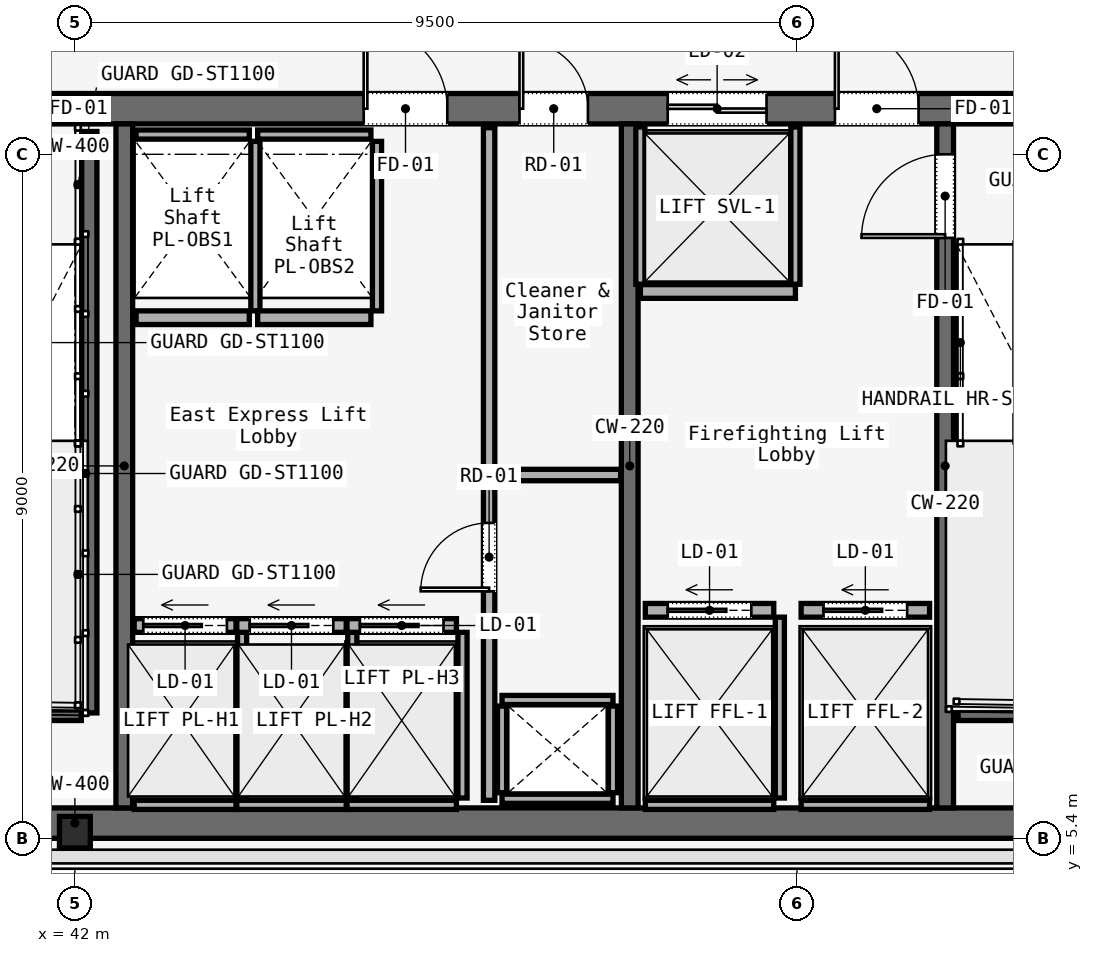
"""IFC4 building model, lengths in metres.
Left out: names, types, materials, properties, quantities, classifications, styles, units other than length and angle.
Written with IfcOpenShell. Run it as: python <this file> out.ifc"""

import sys

from ifc_helpers import new_model, si_unit, direction, frame, frame_2d, origin, origin_2d, place, context, subcontext, project, spatial, rectangle, i_section, extrude, element, fill, save


model = new_model("IFC4")
c1 = context("Model", 3, precision=1e-05, world=origin(), true_north=direction((0.0, 1.0)))
c2 = subcontext(c1, "Body", "Model", "MODEL_VIEW")
j1 = project(units=[si_unit("LENGTHUNIT", "METRE"), si_unit("PLANEANGLEUNIT", "RADIAN")], contexts=[c1])
p1 = place(None, origin())
s1 = spatial("IfcSite", under=j1, at=p1, CompositionType="ELEMENT")
p2 = place(p1, origin())
s2 = spatial("IfcBuilding", under=s1, at=p2, CompositionType="ELEMENT")
p3 = place(p2, frame((0.0, 0.0, 256.0)))
s3 = spatial("IfcBuildingStorey", under=s2, at=p3, CompositionType="ELEMENT", Elevation=256.0)
p4 = place(p3, frame((26.45, 15.0, 0.0), z_axis=(0.0, 0.0, 1.0), x_axis=(1.0, 0.0, 0.0)))
e1 = element("IfcWall", 1, at=p4, inside=s3, PredefinedType="SOLIDWALL", context=c2, shape_type="SweptSolid", body=[
    extrude(rectangle(XDim=31.1, YDim=0.4, at=frame_2d((15.55, 0.0))), origin(), (0.0, 0.0, 1.0), 3.58),
])
p5 = place(p4, frame((1.65, 0.0, 0.0)))
e2 = element("IfcOpeningElement", 2, at=p5, cuts=e1, PredefinedType="OPENING", context=c2, shape_type="SweptSolid", body=[
    extrude(rectangle(XDim=1.1, YDim=2.2, at=frame_2d((0.55, 1.1))), frame((0.0, 0.2, 0.0), z_axis=(0.0, -1.0, 0.0), x_axis=(1.0, 0.0, 0.0)), (0.0, 0.0, 1.0), 0.4),
])
p6 = place(p4, frame((13.65, 0.0, 0.0)))
e3 = element("IfcOpeningElement", 3, at=p6, cuts=e1, PredefinedType="OPENING", context=c2, shape_type="SweptSolid", body=[
    extrude(rectangle(XDim=1.1, YDim=2.2, at=frame_2d((0.55, 1.1))), frame((0.0, 0.2, 0.0), z_axis=(0.0, -1.0, 0.0), x_axis=(1.0, 0.0, 0.0)), (0.0, 0.0, 1.0), 0.4),
])
p7 = place(p4, frame((25.55, 0.0, 0.0)))
e4 = element("IfcOpeningElement", 4, at=p7, cuts=e1, PredefinedType="OPENING", context=c2, shape_type="SweptSolid", body=[
    extrude(rectangle(XDim=1.1, YDim=2.2, at=frame_2d((0.55, 1.1))), frame((0.0, 0.2, 0.0), z_axis=(0.0, -1.0, 0.0), x_axis=(1.0, 0.0, 0.0)), (0.0, 0.0, 1.0), 0.4),
])
p8 = place(p4, frame((19.35, 0.0, 0.0)))
e5 = element("IfcOpeningElement", 5, at=p8, cuts=e1, PredefinedType="OPENING", context=c2, shape_type="SweptSolid", body=[
    extrude(rectangle(XDim=1.1, YDim=2.2, at=frame_2d((0.55, 1.1))), frame((0.0, 0.2, 0.0), z_axis=(0.0, -1.0, 0.0), x_axis=(1.0, 0.0, 0.0)), (0.0, 0.0, 1.0), 0.4),
])
p9 = place(p4, frame((21.4, 0.0, 0.0)))
e6 = element("IfcOpeningElement", 6, at=p9, cuts=e1, PredefinedType="OPENING", context=c2, shape_type="SweptSolid", body=[
    extrude(rectangle(XDim=0.9, YDim=2.1, at=frame_2d((0.45, 1.05))), frame((0.0, 0.2, 0.0), z_axis=(0.0, -1.0, 0.0), x_axis=(1.0, 0.0, 0.0)), (0.0, 0.0, 1.0), 0.4),
])
p10 = place(p4, frame((6.04, 0.0, 0.0)))
e7 = element("IfcOpeningElement", 7, at=p10, cuts=e1, PredefinedType="OPENING", context=c2, shape_type="SweptSolid", body=[
    extrude(rectangle(XDim=0.95, YDim=2.2, at=frame_2d((0.475, 1.1))), frame((0.0, 0.2, 0.0), z_axis=(0.0, -1.0, 0.0), x_axis=(1.0, 0.0, 0.0)), (0.0, 0.0, 1.0), 0.4),
])
p11 = place(p4, frame((9.99, 0.0, 0.0)))
e8 = element("IfcOpeningElement", 8, at=p11, cuts=e1, PredefinedType="OPENING", context=c2, shape_type="SweptSolid", body=[
    extrude(rectangle(XDim=0.95, YDim=2.2, at=frame_2d((0.475, 1.1))), frame((0.0, 0.2, 0.0), z_axis=(0.0, -1.0, 0.0), x_axis=(1.0, 0.0, 0.0)), (0.0, 0.0, 1.0), 0.4),
])
p12 = place(p4, frame((23.35, 0.0, 0.0)))
e9 = element("IfcOpeningElement", 9, at=p12, cuts=e1, PredefinedType="OPENING", context=c2, shape_type="SweptSolid", body=[
    extrude(rectangle(XDim=1.3, YDim=2.3, at=frame_2d((0.65, 1.15))), frame((0.0, 0.2, 0.0), z_axis=(0.0, -1.0, 0.0), x_axis=(1.0, 0.0, 0.0)), (0.0, 0.0, 1.0), 0.4),
])
p13 = place(p3, frame((26.45, 5.6, 0.0), z_axis=(0.0, 0.0, 1.0), x_axis=(1.0, 0.0, 0.0)))
e10 = element("IfcWall", 10, at=p13, inside=s3, PredefinedType="SOLIDWALL", context=c2, shape_type="SweptSolid", body=[
    extrude(rectangle(XDim=31.1, YDim=0.4, at=frame_2d((15.55, 0.0))), origin(), (0.0, 0.0, 1.0), 3.58),
])
for number, where, z_axis, x_axis in (
    (11, (42.65, 5.8, 0.0), (0.0, 0.0, 1.0), (0.0, 1.0, 0.0)),
    (12, (49.3, 5.8, 0.0), (0.0, 0.0, 1.0), (0.0, 1.0, 0.0)),
):
    element("IfcWall", number, at=place(p3, frame(where, z_axis=z_axis, x_axis=x_axis)), inside=s3, PredefinedType="SOLIDWALL", context=c2, shape_type="SweptSolid", body=[
        extrude(rectangle(XDim=9.0, YDim=0.22, at=frame_2d((4.5, 0.0))), origin(), (0.0, 0.0, 1.0), 3.58),
    ])
p14 = place(p3, frame((53.45, 5.8, 0.0), z_axis=(0.0, 0.0, 1.0), x_axis=(0.0, 1.0, 0.0)))
e13 = element("IfcWall", 13, at=p14, inside=s3, PredefinedType="SOLIDWALL", context=c2, shape_type="SweptSolid", body=[
    extrude(rectangle(XDim=9.0, YDim=0.22, at=frame_2d((4.5, 0.0))), origin(), (0.0, 0.0, 1.0), 3.58),
])
p15 = place(p14, frame((7.5, 0.0, 0.0)))
e14 = element("IfcOpeningElement", 14, at=p15, cuts=e13, PredefinedType="OPENING", context=c2, shape_type="SweptSolid", body=[
    extrude(rectangle(XDim=1.1, YDim=2.2, at=frame_2d((0.55, 1.1))), frame((0.0, 0.11, 0.0), z_axis=(0.0, -1.0, 0.0), x_axis=(1.0, 0.0, 0.0)), (0.0, 0.0, 1.0), 0.22),
])
p16 = place(p3, frame((42.0, 5.48, 0.0), z_axis=(0.0, 0.0, 1.0), x_axis=(1.0, 0.0, 0.0)))
e15 = element("IfcColumn", 15, at=p16, inside=s3, PredefinedType="COLUMN", context=c2, shape_type="SweptSolid", body=[
    extrude(i_section(OverallWidth=0.406, OverallDepth=0.416, WebThickness=0.03, FlangeThickness=0.037, FilletRadius=0.015, at=origin_2d()), origin(), (0.0, 0.0, 1.0), 3.58),
])
p17 = place(p3, frame((42.19, 14.7, 0.0), z_axis=(0.0, 0.0, 1.0), x_axis=(0.0, -1.0, 0.0)))
e16 = element("IfcWall", 16, at=p17, inside=s3, PredefinedType="SOLIDWALL", context=c2, shape_type="SweptSolid", body=[
    extrude(rectangle(XDim=7.65, YDim=0.2, at=frame_2d((3.825, 0.0))), origin(), (0.0, 0.0, 1.0), 3.8),
])
for number, where, z_axis, x_axis in (
    (17, (38.97, 7.05, 0.0), (0.0, 0.0, 1.0), (1.0, 0.0, 0.0)),
    (18, (53.62, 7.05, 0.0), (0.0, 0.0, 1.0), (1.0, 0.0, 0.0)),
):
    element("IfcWall", number, at=place(p3, frame(where, z_axis=z_axis, x_axis=x_axis)), inside=s3, PredefinedType="SOLIDWALL", context=c2, shape_type="SweptSolid", body=[
        extrude(rectangle(XDim=3.115, YDim=0.2, at=frame_2d((1.558, 0.0))), origin(), (0.0, 0.0, 1.0), 3.8),
    ])
for number, where, z_axis, x_axis in (
    (19, (47.62, 5.92, 0.0), (0.0, 0.0, 1.0), (1.0, 0.0, 0.0)),
    (20, (47.62, 7.22, 0.0), (0.0, 0.0, 1.0), (1.0, 0.0, 0.0)),
):
    element("IfcWall", number, at=place(p3, frame(where, z_axis=z_axis, x_axis=x_axis)), inside=s3, PredefinedType="SOLIDWALL", context=c2, shape_type="SweptSolid", body=[
        extrude(rectangle(XDim=1.46, YDim=0.12, at=frame_2d((0.73, 0.0))), origin(), (0.0, 0.0, 1.0), 3.01),
    ])
for number, where, z_axis, x_axis in (
    (21, (47.62, 6.0, 0.0), (0.0, 0.0, 1.0), (0.0, 1.0, 0.0)),
    (22, (49.08, 6.0, 0.0), (0.0, 0.0, 1.0), (0.0, 1.0, 0.0)),
):
    element("IfcWall", number, at=place(p3, frame(where, z_axis=z_axis, x_axis=x_axis)), inside=s3, PredefinedType="SOLIDWALL", context=c2, shape_type="SweptSolid", body=[
        extrude(rectangle(XDim=1.14, YDim=0.12, at=frame_2d((0.57, 0.0))), origin(), (0.0, 0.0, 1.0), 3.01),
    ])
p18 = place(p3, frame((47.45, 5.9, 0.0), z_axis=(0.0, 0.0, 1.0), x_axis=(0.0, 1.0, 0.0)))
e23 = element("IfcWall", 23, at=p18, inside=s3, PredefinedType="PARTITIONING", context=c2, shape_type="SweptSolid", body=[
    extrude(rectangle(XDim=8.85, YDim=0.15, at=frame_2d((4.425, 0.0))), origin(), (0.0, 0.0, 1.0), 3.01),
])
p19 = place(p18, frame((2.75, 0.0, 0.0)))
e24 = element("IfcOpeningElement", 24, at=p19, cuts=e23, PredefinedType="OPENING", context=c2, shape_type="SweptSolid", body=[
    extrude(rectangle(XDim=0.9, YDim=2.1, at=frame_2d((0.45, 1.05))), frame((0.0, 0.075, 0.0), z_axis=(0.0, -1.0, 0.0), x_axis=(1.0, 0.0, 0.0)), (0.0, 0.0, 1.0), 0.15),
])
p20 = place(p3, frame((47.45, 10.18, 0.0), z_axis=(0.0, 0.0, 1.0), x_axis=(1.0, 0.0, 0.0)))
e25 = element("IfcWall", 25, at=p20, inside=s3, PredefinedType="PARTITIONING", context=c2, shape_type="SweptSolid", body=[
    extrude(rectangle(XDim=1.73, YDim=0.15, at=frame_2d((0.865, 0.0))), origin(), (0.0, 0.0, 1.0), 3.01),
])
p21 = place(p3, frame((42.78, 8.2, 0.0), z_axis=(0.0, 0.0, 1.0), x_axis=(1.0, 0.0, 0.0)))
e26 = element("IfcWall", 26, at=p21, inside=s3, PredefinedType="SOLIDWALL", context=c2, shape_type="SweptSolid", body=[
    extrude(rectangle(XDim=1.34, YDim=0.18, at=frame_2d((0.67, 0.0))), origin(), (0.0, 0.0, 1.0), 3.01),
])
p22 = place(p21, frame((0.12, 0.0, 0.0)))
e27 = element("IfcOpeningElement", 27, at=p22, cuts=e26, PredefinedType="OPENING", context=c2, shape_type="SweptSolid", body=[
    extrude(rectangle(XDim=1.1, YDim=2.2, at=frame_2d((0.55, 1.1))), frame((0.0, 0.09, 0.0), z_axis=(0.0, -1.0, 0.0), x_axis=(1.0, 0.0, 0.0)), (0.0, 0.0, 1.0), 0.18),
])
p23 = place(p3, frame((42.78, 5.84, 0.0), z_axis=(0.0, 0.0, 1.0), x_axis=(1.0, 0.0, 0.0)))
e28 = element("IfcWall", 28, at=p23, inside=s3, PredefinedType="SOLIDWALL", context=c2, shape_type="SweptSolid", body=[
    extrude(rectangle(XDim=1.34, YDim=0.12, at=frame_2d((0.67, 0.0))), origin(), (0.0, 0.0, 1.0), 3.01),
])
p24 = place(p3, frame((44.2, 5.93, 0.0), z_axis=(0.0, 0.0, 1.0), x_axis=(0.0, 1.0, 0.0)))
e29 = element("IfcWall", 29, at=p24, inside=s3, PredefinedType="SOLIDWALL", context=c2, shape_type="SweptSolid", body=[
    extrude(rectangle(XDim=2.18, YDim=0.12, at=frame_2d((1.09, 0.0))), origin(), (0.0, 0.0, 1.0), 3.01),
])
p25 = place(p3, frame((44.13, 8.2, 0.0), z_axis=(0.0, 0.0, 1.0), x_axis=(1.0, 0.0, 0.0)))
e30 = element("IfcWall", 30, at=p25, inside=s3, PredefinedType="SOLIDWALL", context=c2, shape_type="SweptSolid", body=[
    extrude(rectangle(XDim=1.44, YDim=0.18, at=frame_2d((0.72, 0.0))), origin(), (0.0, 0.0, 1.0), 3.01),
])
p26 = place(p25, frame((0.17, 0.0, 0.0)))
e31 = element("IfcOpeningElement", 31, at=p26, cuts=e30, PredefinedType="OPENING", context=c2, shape_type="SweptSolid", body=[
    extrude(rectangle(XDim=1.1, YDim=2.2, at=frame_2d((0.55, 1.1))), frame((0.0, 0.09, 0.0), z_axis=(0.0, -1.0, 0.0), x_axis=(1.0, 0.0, 0.0)), (0.0, 0.0, 1.0), 0.18),
])
p27 = place(p3, frame((44.13, 5.84, 0.0), z_axis=(0.0, 0.0, 1.0), x_axis=(1.0, 0.0, 0.0)))
e32 = element("IfcWall", 32, at=p27, inside=s3, PredefinedType="SOLIDWALL", context=c2, shape_type="SweptSolid", body=[
    extrude(rectangle(XDim=1.44, YDim=0.12, at=frame_2d((0.72, 0.0))), origin(), (0.0, 0.0, 1.0), 3.01),
])
p28 = place(p3, frame((45.65, 5.93, 0.0), z_axis=(0.0, 0.0, 1.0), x_axis=(0.0, 1.0, 0.0)))
e33 = element("IfcWall", 33, at=p28, inside=s3, PredefinedType="SOLIDWALL", context=c2, shape_type="SweptSolid", body=[
    extrude(rectangle(XDim=2.18, YDim=0.12, at=frame_2d((1.09, 0.0))), origin(), (0.0, 0.0, 1.0), 3.01),
])
p29 = place(p3, frame((45.58, 8.2, 0.0), z_axis=(0.0, 0.0, 1.0), x_axis=(1.0, 0.0, 0.0)))
e34 = element("IfcWall", 34, at=p29, inside=s3, PredefinedType="SOLIDWALL", context=c2, shape_type="SweptSolid", body=[
    extrude(rectangle(XDim=1.44, YDim=0.18, at=frame_2d((0.72, 0.0))), origin(), (0.0, 0.0, 1.0), 3.01),
])
p30 = place(p29, frame((0.17, 0.0, 0.0)))
e35 = element("IfcOpeningElement", 35, at=p30, cuts=e34, PredefinedType="OPENING", context=c2, shape_type="SweptSolid", body=[
    extrude(rectangle(XDim=1.1, YDim=2.2, at=frame_2d((0.55, 1.1))), frame((0.0, 0.09, 0.0), z_axis=(0.0, -1.0, 0.0), x_axis=(1.0, 0.0, 0.0)), (0.0, 0.0, 1.0), 0.18),
])
p31 = place(p3, frame((45.58, 5.84, 0.0), z_axis=(0.0, 0.0, 1.0), x_axis=(1.0, 0.0, 0.0)))
e36 = element("IfcWall", 36, at=p31, inside=s3, PredefinedType="SOLIDWALL", context=c2, shape_type="SweptSolid", body=[
    extrude(rectangle(XDim=1.44, YDim=0.12, at=frame_2d((0.72, 0.0))), origin(), (0.0, 0.0, 1.0), 3.01),
])
p32 = place(p3, frame((47.1, 5.93, 0.0), z_axis=(0.0, 0.0, 1.0), x_axis=(0.0, 1.0, 0.0)))
e37 = element("IfcWall", 37, at=p32, inside=s3, PredefinedType="SOLIDWALL", context=c2, shape_type="SweptSolid", body=[
    extrude(rectangle(XDim=2.18, YDim=0.12, at=frame_2d((1.09, 0.0))), origin(), (0.0, 0.0, 1.0), 3.01),
])
p33 = place(p3, frame((42.805, 12.25, 0.0), z_axis=(0.0, 0.0, 1.0), x_axis=(1.0, 0.0, 0.0)))
e38 = element("IfcWall", 38, at=p33, inside=s3, PredefinedType="SOLIDWALL", context=c2, shape_type="SweptSolid", body=[
    extrude(rectangle(XDim=1.49, YDim=0.18, at=frame_2d((0.745, 0.0))), origin(), (0.0, 0.0, 1.0), 3.01),
])
p34 = place(p3, frame((42.805, 14.66, 0.0), z_axis=(0.0, 0.0, 1.0), x_axis=(1.0, 0.0, 0.0)))
e39 = element("IfcWall", 39, at=p34, inside=s3, PredefinedType="SOLIDWALL", context=c2, shape_type="SweptSolid", body=[
    extrude(rectangle(XDim=1.49, YDim=0.12, at=frame_2d((0.745, 0.0))), origin(), (0.0, 0.0, 1.0), 3.01),
])
p35 = place(p3, frame((44.375, 12.34, 0.0), z_axis=(0.0, 0.0, 1.0), x_axis=(0.0, 1.0, 0.0)))
e40 = element("IfcWall", 40, at=p35, inside=s3, PredefinedType="SOLIDWALL", context=c2, shape_type="SweptSolid", body=[
    extrude(rectangle(XDim=2.23, YDim=0.12, at=frame_2d((1.115, 0.0))), origin(), (0.0, 0.0, 1.0), 3.01),
])
p36 = place(p3, frame((44.405, 12.25, 0.0), z_axis=(0.0, 0.0, 1.0), x_axis=(1.0, 0.0, 0.0)))
e41 = element("IfcWall", 41, at=p36, inside=s3, PredefinedType="SOLIDWALL", context=c2, shape_type="SweptSolid", body=[
    extrude(rectangle(XDim=1.49, YDim=0.18, at=frame_2d((0.745, 0.0))), origin(), (0.0, 0.0, 1.0), 3.01),
])
p37 = place(p3, frame((44.405, 14.66, 0.0), z_axis=(0.0, 0.0, 1.0), x_axis=(1.0, 0.0, 0.0)))
e42 = element("IfcWall", 42, at=p37, inside=s3, PredefinedType="SOLIDWALL", context=c2, shape_type="SweptSolid", body=[
    extrude(rectangle(XDim=1.49, YDim=0.12, at=frame_2d((0.745, 0.0))), origin(), (0.0, 0.0, 1.0), 3.01),
])
p38 = place(p3, frame((45.975, 12.34, 0.0), z_axis=(0.0, 0.0, 1.0), x_axis=(0.0, 1.0, 0.0)))
e43 = element("IfcWall", 43, at=p38, inside=s3, PredefinedType="SOLIDWALL", context=c2, shape_type="SweptSolid", body=[
    extrude(rectangle(XDim=2.23, YDim=0.12, at=frame_2d((1.115, 0.0))), origin(), (0.0, 0.0, 1.0), 3.01),
])
p39 = place(p3, frame((49.505, 8.4, 0.0), z_axis=(0.0, 0.0, 1.0), x_axis=(1.0, 0.0, 0.0)))
e44 = element("IfcWall", 44, at=p39, inside=s3, PredefinedType="SOLIDWALL", context=c2, shape_type="SweptSolid", body=[
    extrude(rectangle(XDim=1.69, YDim=0.18, at=frame_2d((0.845, 0.0))), origin(), (0.0, 0.0, 1.0), 3.01),
])
p40 = place(p39, frame((0.295, 0.0, 0.0)))
e45 = element("IfcOpeningElement", 45, at=p40, cuts=e44, PredefinedType="OPENING", context=c2, shape_type="SweptSolid", body=[
    extrude(rectangle(XDim=1.1, YDim=2.2, at=frame_2d((0.55, 1.1))), frame((0.0, 0.09, 0.0), z_axis=(0.0, -1.0, 0.0), x_axis=(1.0, 0.0, 0.0)), (0.0, 0.0, 1.0), 0.18),
])
p41 = place(p3, frame((49.505, 5.84, 0.0), z_axis=(0.0, 0.0, 1.0), x_axis=(1.0, 0.0, 0.0)))
e46 = element("IfcWall", 46, at=p41, inside=s3, PredefinedType="SOLIDWALL", context=c2, shape_type="SweptSolid", body=[
    extrude(rectangle(XDim=1.69, YDim=0.12, at=frame_2d((0.845, 0.0))), origin(), (0.0, 0.0, 1.0), 3.01),
])
p42 = place(p3, frame((51.275, 5.93, 0.0), z_axis=(0.0, 0.0, 1.0), x_axis=(0.0, 1.0, 0.0)))
e47 = element("IfcWall", 47, at=p42, inside=s3, PredefinedType="SOLIDWALL", context=c2, shape_type="SweptSolid", body=[
    extrude(rectangle(XDim=2.38, YDim=0.12, at=frame_2d((1.19, 0.0))), origin(), (0.0, 0.0, 1.0), 3.01),
])
p43 = place(p3, frame((51.555, 8.4, 0.0), z_axis=(0.0, 0.0, 1.0), x_axis=(1.0, 0.0, 0.0)))
e48 = element("IfcWall", 48, at=p43, inside=s3, PredefinedType="SOLIDWALL", context=c2, shape_type="SweptSolid", body=[
    extrude(rectangle(XDim=1.69, YDim=0.18, at=frame_2d((0.845, 0.0))), origin(), (0.0, 0.0, 1.0), 3.01),
])
p44 = place(p43, frame((0.295, 0.0, 0.0)))
e49 = element("IfcOpeningElement", 49, at=p44, cuts=e48, PredefinedType="OPENING", context=c2, shape_type="SweptSolid", body=[
    extrude(rectangle(XDim=1.1, YDim=2.2, at=frame_2d((0.55, 1.1))), frame((0.0, 0.09, 0.0), z_axis=(0.0, -1.0, 0.0), x_axis=(1.0, 0.0, 0.0)), (0.0, 0.0, 1.0), 0.18),
])
p45 = place(p3, frame((51.555, 5.84, 0.0), z_axis=(0.0, 0.0, 1.0), x_axis=(1.0, 0.0, 0.0)))
e50 = element("IfcWall", 50, at=p45, inside=s3, PredefinedType="SOLIDWALL", context=c2, shape_type="SweptSolid", body=[
    extrude(rectangle(XDim=1.69, YDim=0.12, at=frame_2d((0.845, 0.0))), origin(), (0.0, 0.0, 1.0), 3.01),
])
p46 = place(p3, frame((49.44, 12.595, 0.0), z_axis=(0.0, 0.0, 1.0), x_axis=(1.0, 0.0, 0.0)))
e51 = element("IfcWall", 51, at=p46, inside=s3, PredefinedType="SOLIDWALL", context=c2, shape_type="SweptSolid", body=[
    extrude(rectangle(XDim=2.04, YDim=0.18, at=frame_2d((1.02, 0.0))), origin(), (0.0, 0.0, 1.0), 3.01),
])
for number, where, z_axis, x_axis in (
    (52, (49.44, 12.69, 0.0), (0.0, 0.0, 1.0), (0.0, 1.0, 0.0)),
    (53, (51.48, 12.69, 0.0), (0.0, 0.0, 1.0), (0.0, 1.0, 0.0)),
):
    element("IfcWall", number, at=place(p3, frame(where, z_axis=z_axis, x_axis=x_axis)), inside=s3, PredefinedType="SOLIDWALL", context=c2, shape_type="SweptSolid", body=[
        extrude(rectangle(XDim=2.07, YDim=0.12, at=frame_2d((1.035, 0.0))), origin(), (0.0, 0.0, 1.0), 3.01),
    ])
p47 = place(p7, origin())
e54 = element("IfcDoor", 54, at=p47, inside=s3, OperationType="SINGLE_SWING_RIGHT", PredefinedType="DOOR", context=c2, shape_type="SweptSolid", body=[
    extrude(rectangle(XDim=1.1, YDim=2.2, at=frame_2d((0.55, 1.1))), frame((0.0, 0.025, 0.0), z_axis=(0.0, -1.0, 0.0), x_axis=(1.0, 0.0, 0.0)), (0.0, 0.0, 1.0), 0.05),
])
fill(e4, e54)
p48 = place(p8, origin())
e55 = element("IfcDoor", 55, at=p48, inside=s3, OperationType="SINGLE_SWING_LEFT", PredefinedType="DOOR", context=c2, shape_type="SweptSolid", body=[
    extrude(rectangle(XDim=1.1, YDim=2.2, at=frame_2d((0.55, 1.1))), frame((0.0, 0.025, 0.0), z_axis=(0.0, -1.0, 0.0), x_axis=(1.0, 0.0, 0.0)), (0.0, 0.0, 1.0), 0.05),
])
fill(e5, e55)
p49 = place(p9, origin())
e56 = element("IfcDoor", 56, at=p49, inside=s3, OperationType="SINGLE_SWING_LEFT", PredefinedType="DOOR", context=c2, shape_type="SweptSolid", body=[
    extrude(rectangle(XDim=0.9, YDim=2.1, at=frame_2d((0.45, 1.05))), frame((0.0, 0.025, 0.0), z_axis=(0.0, -1.0, 0.0), x_axis=(1.0, 0.0, 0.0)), (0.0, 0.0, 1.0), 0.05),
])
fill(e6, e56)
p50 = place(p15, origin())
e57 = element("IfcDoor", 57, at=p50, inside=s3, OperationType="SINGLE_SWING_LEFT", PredefinedType="DOOR", context=c2, shape_type="SweptSolid", body=[
    extrude(rectangle(XDim=1.1, YDim=2.2, at=frame_2d((0.55, 1.1))), frame((0.0, 0.025, 0.0), z_axis=(0.0, -1.0, 0.0), x_axis=(1.0, 0.0, 0.0)), (0.0, 0.0, 1.0), 0.05),
])
fill(e14, e57)
p51 = place(p19, origin())
e58 = element("IfcDoor", 58, at=p51, inside=s3, OperationType="SINGLE_SWING_RIGHT", PredefinedType="DOOR", context=c2, shape_type="SweptSolid", body=[
    extrude(rectangle(XDim=0.9, YDim=2.1, at=frame_2d((0.45, 1.05))), frame((0.0, 0.025, 0.0), z_axis=(0.0, -1.0, 0.0), x_axis=(1.0, 0.0, 0.0)), (0.0, 0.0, 1.0), 0.05),
])
fill(e24, e58)
p52 = place(p22, origin())
e59 = element("IfcDoor", 59, at=p52, inside=s3, OperationType="SLIDING_TO_LEFT", PredefinedType="DOOR", context=c2, shape_type="SweptSolid", body=[
    extrude(rectangle(XDim=1.1, YDim=2.2, at=frame_2d((0.55, 1.1))), frame((0.0, 0.025, 0.0), z_axis=(0.0, -1.0, 0.0), x_axis=(1.0, 0.0, 0.0)), (0.0, 0.0, 1.0), 0.05),
])
fill(e27, e59)
p53 = place(p26, origin())
e60 = element("IfcDoor", 60, at=p53, inside=s3, OperationType="SLIDING_TO_LEFT", PredefinedType="DOOR", context=c2, shape_type="SweptSolid", body=[
    extrude(rectangle(XDim=1.1, YDim=2.2, at=frame_2d((0.55, 1.1))), frame((0.0, 0.025, 0.0), z_axis=(0.0, -1.0, 0.0), x_axis=(1.0, 0.0, 0.0)), (0.0, 0.0, 1.0), 0.05),
])
fill(e31, e60)
p54 = place(p30, origin())
e61 = element("IfcDoor", 61, at=p54, inside=s3, OperationType="SLIDING_TO_LEFT", PredefinedType="DOOR", context=c2, shape_type="SweptSolid", body=[
    extrude(rectangle(XDim=1.1, YDim=2.2, at=frame_2d((0.55, 1.1))), frame((0.0, 0.025, 0.0), z_axis=(0.0, -1.0, 0.0), x_axis=(1.0, 0.0, 0.0)), (0.0, 0.0, 1.0), 0.05),
])
fill(e35, e61)
p55 = place(p40, origin())
e62 = element("IfcDoor", 62, at=p55, inside=s3, OperationType="SLIDING_TO_LEFT", PredefinedType="DOOR", context=c2, shape_type="SweptSolid", body=[
    extrude(rectangle(XDim=1.1, YDim=2.2, at=frame_2d((0.55, 1.1))), frame((0.0, 0.025, 0.0), z_axis=(0.0, -1.0, 0.0), x_axis=(1.0, 0.0, 0.0)), (0.0, 0.0, 1.0), 0.05),
])
fill(e45, e62)
p56 = place(p44, origin())
e63 = element("IfcDoor", 63, at=p56, inside=s3, OperationType="SLIDING_TO_LEFT", PredefinedType="DOOR", context=c2, shape_type="SweptSolid", body=[
    extrude(rectangle(XDim=1.1, YDim=2.2, at=frame_2d((0.55, 1.1))), frame((0.0, 0.025, 0.0), z_axis=(0.0, -1.0, 0.0), x_axis=(1.0, 0.0, 0.0)), (0.0, 0.0, 1.0), 0.05),
])
fill(e49, e63)
p57 = place(p12, origin())
e64 = element("IfcDoor", 64, at=p57, inside=s3, OperationType="DOUBLE_DOOR_SLIDING", PredefinedType="DOOR", context=c2, shape_type="SweptSolid", body=[
    extrude(rectangle(XDim=1.3, YDim=2.3, at=frame_2d((0.65, 1.15))), frame((0.0, 0.025, 0.0), z_axis=(0.0, -1.0, 0.0), x_axis=(1.0, 0.0, 0.0)), (0.0, 0.0, 1.0), 0.05),
])
fill(e9, e64)
save(model, sys.argv[1])
